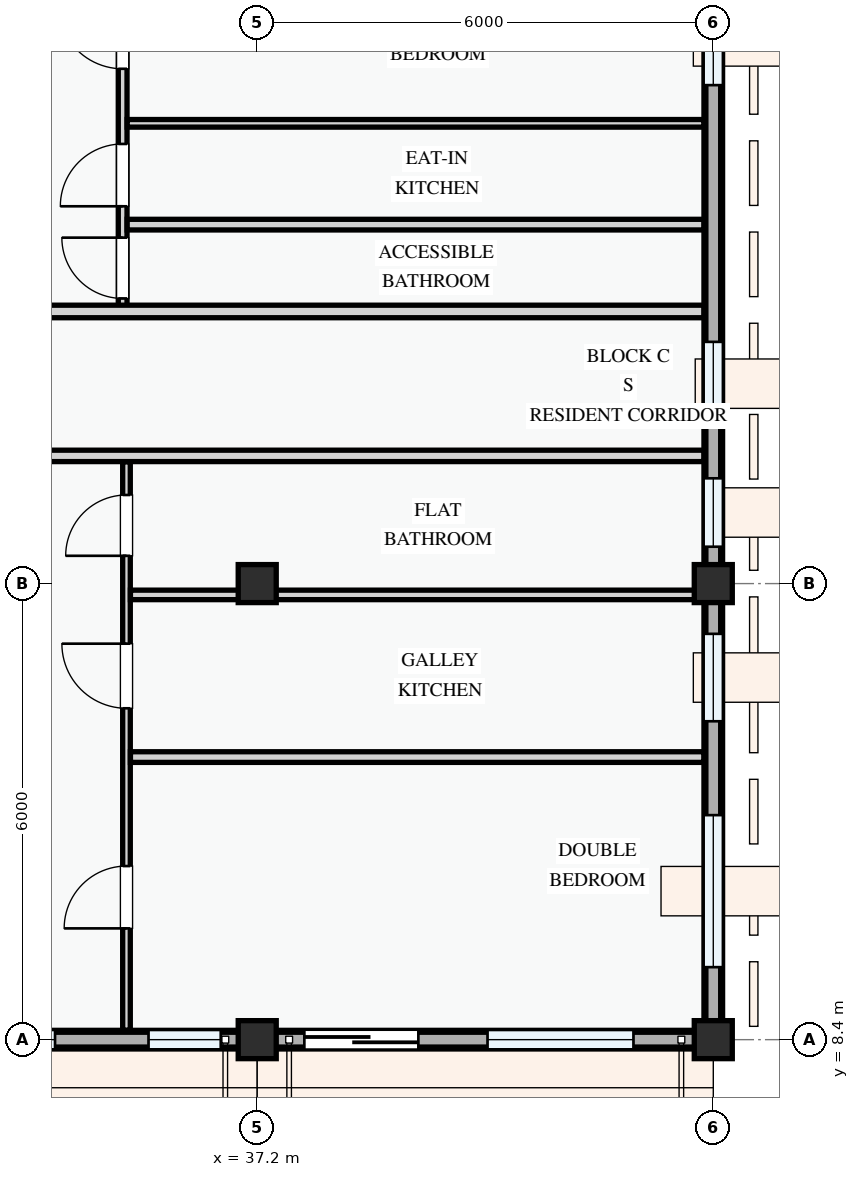
"""IFC4 building model, lengths in metres.
Left out: names, types, materials, properties, quantities, classifications, styles, units other than length and angle.
Written with IfcOpenShell. Run it as: python <this file> out.ifc"""

import sys

from ifc_helpers import new_model, si_unit, direction, frame, frame_2d, origin, origin_2d, place, context, subcontext, project, spatial, polyline, rectangle, outline, extrude, element, fill, save


model = new_model("IFC4")
c1 = context("Model", 3, precision=1e-05, world=origin(), true_north=direction((0.0, 1.0)))
c2 = subcontext(c1, "Body", "Model", "MODEL_VIEW")
j1 = project(units=[si_unit("LENGTHUNIT", "METRE"), si_unit("PLANEANGLEUNIT", "RADIAN")], contexts=[c1])
p1 = place(None, origin())
s1 = spatial("IfcSite", under=j1, at=p1, CompositionType="ELEMENT")
p2 = place(p1, origin())
s2 = spatial("IfcBuilding", under=s1, at=p2, CompositionType="ELEMENT")
p3 = place(p2, frame((0.0, 0.0, 34.5)))
s3 = spatial("IfcBuildingStorey", under=s2, at=p3, CompositionType="ELEMENT", Elevation=34.5)
for number, where, z_axis, x_axis in (
    (1, (37.2, 8.4, 0.0), (0.0, 0.0, 1.0), (1.0, 0.0, 0.0)),
    (2, (37.2, 14.4, 0.0), (0.0, 0.0, 1.0), (1.0, 0.0, 0.0)),
    (3, (43.2, 8.4, 0.0), (0.0, 0.0, 1.0), (1.0, 0.0, 0.0)),
    (4, (43.2, 14.4, 0.0), (0.0, 0.0, 1.0), (1.0, 0.0, 0.0)),
):
    element("IfcColumn", number, at=place(p3, frame(where, z_axis=z_axis, x_axis=x_axis)), inside=s3, PredefinedType="COLUMN", context=c2, shape_type="SweptSolid", body=[
        extrude(rectangle(XDim=0.5, YDim=0.5, at=origin_2d()), origin(), (0.0, 0.0, 1.0), 3.3),
    ])
p4 = place(p3, frame((28.8, 8.4, 0.0), z_axis=(0.0, 0.0, 1.0), x_axis=(1.0, 0.0, 0.0)))
e5 = element("IfcWall", 5, at=p4, inside=s3, PredefinedType="STANDARD", context=c2, shape_type="SweptSolid", body=[
    extrude(rectangle(XDim=8.4, YDim=0.245, at=frame_2d((4.2, 0.0))), origin(), (0.0, 0.0, 1.0), 2.375),
])
p5 = place(p4, frame((2.15, 0.0, 0.0)))
e6 = element("IfcOpeningElement", 6, at=p5, cuts=e5, PredefinedType="OPENING", context=c2, shape_type="SweptSolid", body=[
    extrude(rectangle(XDim=1.4, YDim=2.2, at=frame_2d((0.7, 1.1))), frame((0.0, 0.133, 0.0), z_axis=(0.0, -1.0, 0.0), x_axis=(1.0, 0.0, 0.0)), (0.0, 0.0, 1.0), 0.265),
])
p6 = place(p4, frame((0.505, 0.0, 0.78)))
e7 = element("IfcOpeningElement", 7, at=p6, cuts=e5, PredefinedType="OPENING", context=c2, shape_type="SweptSolid", body=[
    extrude(rectangle(XDim=1.0, YDim=1.25, at=frame_2d((0.5, 0.625))), frame((0.0, 0.133, 0.0), z_axis=(0.0, -1.0, 0.0), x_axis=(1.0, 0.0, 0.0)), (0.0, 0.0, 1.0), 0.265),
])
p7 = place(p4, frame((4.54, 0.0, 0.78)))
e8 = element("IfcOpeningElement", 8, at=p7, cuts=e5, PredefinedType="OPENING", context=c2, shape_type="SweptSolid", body=[
    extrude(rectangle(XDim=1.2, YDim=1.35, at=frame_2d((0.6, 0.675))), frame((0.0, 0.133, 0.0), z_axis=(0.0, -1.0, 0.0), x_axis=(1.0, 0.0, 0.0)), (0.0, 0.0, 1.0), 0.265),
])
p8 = place(p4, frame((6.97, 0.0, 0.78)))
e9 = element("IfcOpeningElement", 9, at=p8, cuts=e5, PredefinedType="OPENING", context=c2, shape_type="SweptSolid", body=[
    extrude(rectangle(XDim=0.95, YDim=1.15, at=frame_2d((0.475, 0.575))), frame((0.0, 0.133, 0.0), z_axis=(0.0, -1.0, 0.0), x_axis=(1.0, 0.0, 0.0)), (0.0, 0.0, 1.0), 0.265),
])
p9 = place(p3, frame((37.2, 8.4, 0.0), z_axis=(0.0, 0.0, 1.0), x_axis=(1.0, 0.0, 0.0)))
e10 = element("IfcWall", 10, at=p9, inside=s3, PredefinedType="STANDARD", context=c2, shape_type="SweptSolid", body=[
    extrude(rectangle(XDim=6.0, YDim=0.245, at=frame_2d((3.0, 0.0))), origin(), (0.0, 0.0, 1.0), 2.525),
])
p10 = place(p9, frame((0.62, 0.0, 0.0)))
e11 = element("IfcOpeningElement", 11, at=p10, cuts=e10, PredefinedType="OPENING", context=c2, shape_type="SweptSolid", body=[
    extrude(rectangle(XDim=1.5, YDim=2.2, at=frame_2d((0.75, 1.1))), frame((0.0, 0.133, 0.0), z_axis=(0.0, -1.0, 0.0), x_axis=(1.0, 0.0, 0.0)), (0.0, 0.0, 1.0), 0.265),
])
p11 = place(p9, frame((3.03, 0.0, 0.78)))
e12 = element("IfcOpeningElement", 12, at=p11, cuts=e10, PredefinedType="OPENING", context=c2, shape_type="SweptSolid", body=[
    extrude(rectangle(XDim=1.92, YDim=1.44, at=frame_2d((0.96, 0.72))), frame((0.0, 0.133, 0.0), z_axis=(0.0, -1.0, 0.0), x_axis=(1.0, 0.0, 0.0)), (0.0, 0.0, 1.0), 0.265),
])
p12 = place(p3, frame((43.2, 8.4, 0.0), z_axis=(0.0, 0.0, 1.0), x_axis=(0.0, 1.0, 0.0)))
e13 = element("IfcWall", 13, at=p12, inside=s3, PredefinedType="STANDARD", context=c2, shape_type="SweptSolid", body=[
    extrude(rectangle(XDim=6.0, YDim=0.245, at=frame_2d((3.0, 0.0))), origin(), (0.0, 0.0, 1.0), 2.575),
])
p13 = place(p12, frame((0.954, 0.0, 0.78)))
e14 = element("IfcOpeningElement", 14, at=p13, cuts=e13, PredefinedType="OPENING", context=c2, shape_type="SweptSolid", body=[
    extrude(rectangle(XDim=2.0, YDim=1.5, at=frame_2d((1.0, 0.75))), frame((0.0, 0.133, 0.0), z_axis=(0.0, -1.0, 0.0), x_axis=(1.0, 0.0, 0.0)), (0.0, 0.0, 1.0), 0.265),
])
p14 = place(p12, frame((4.189, 0.0, 0.78)))
e15 = element("IfcOpeningElement", 15, at=p14, cuts=e13, PredefinedType="OPENING", context=c2, shape_type="SweptSolid", body=[
    extrude(rectangle(XDim=1.15, YDim=1.25, at=frame_2d((0.575, 0.625))), frame((0.0, 0.133, 0.0), z_axis=(0.0, -1.0, 0.0), x_axis=(1.0, 0.0, 0.0)), (0.0, 0.0, 1.0), 0.265),
])
p15 = place(p3, frame((43.2, 14.4, 0.0), z_axis=(0.0, 0.0, 1.0), x_axis=(0.0, 1.0, 0.0)))
e16 = element("IfcWall", 16, at=p15, inside=s3, PredefinedType="STANDARD", context=c2, shape_type="SweptSolid", body=[
    extrude(rectangle(XDim=8.4, YDim=0.245, at=frame_2d((4.2, 0.0))), origin(), (0.0, 0.0, 1.0), 2.425),
])
p16 = place(p15, frame((0.485, 0.0, 0.78)))
e17 = element("IfcOpeningElement", 17, at=p16, cuts=e16, PredefinedType="OPENING", context=c2, shape_type="SweptSolid", body=[
    extrude(rectangle(XDim=0.9, YDim=1.2, at=frame_2d((0.45, 0.6))), frame((0.0, 0.133, 0.0), z_axis=(0.0, -1.0, 0.0), x_axis=(1.0, 0.0, 0.0)), (0.0, 0.0, 1.0), 0.265),
])
p17 = place(p15, frame((2.08, 0.0, 0.78)))
e18 = element("IfcOpeningElement", 18, at=p17, cuts=e16, PredefinedType="OPENING", context=c2, shape_type="SweptSolid", body=[
    extrude(rectangle(XDim=1.1, YDim=1.3, at=frame_2d((0.55, 0.65))), frame((0.0, 0.133, 0.0), z_axis=(0.0, -1.0, 0.0), x_axis=(1.0, 0.0, 0.0)), (0.0, 0.0, 1.0), 0.265),
])
p18 = place(p15, frame((6.558, 0.0, 0.78)))
e19 = element("IfcOpeningElement", 19, at=p18, cuts=e16, PredefinedType="OPENING", context=c2, shape_type="SweptSolid", body=[
    extrude(rectangle(XDim=1.15, YDim=1.25, at=frame_2d((0.575, 0.625))), frame((0.0, 0.133, 0.0), z_axis=(0.0, -1.0, 0.0), x_axis=(1.0, 0.0, 0.0)), (0.0, 0.0, 1.0), 0.265),
])
p19 = place(p3, frame((28.8, 8.4, 3.3), z_axis=(0.0, 0.0, 1.0), x_axis=(1.0, 0.0, 0.0)))
e20 = element("IfcWall", 20, at=p19, inside=s3, PredefinedType="PARAPET", context=c2, shape_type="SweptSolid", body=[
    extrude(outline(polyline([(0.0, 0.0), (8.4, 0.0), (8.4, 1.12), (7.7, 1.322), (7.0, 1.484), (6.3, 1.618), (5.6, 1.717), (4.9, 1.779), (4.2, 1.8), (3.5, 1.779), (2.8, 1.717), (2.1, 1.618), (1.4, 1.484), (0.7, 1.322), (0.0, 1.12), (0.0, 0.0)])), frame((0.0, 0.098, 0.0), z_axis=(0.0, -1.0, 0.0), x_axis=(1.0, 0.0, 0.0)), (0.0, 0.0, 1.0), 0.195),
])
p20 = place(p3, frame((37.2, 8.4, 3.3), z_axis=(0.0, 0.0, 1.0), x_axis=(1.0, 0.0, 0.0)))
e21 = element("IfcWall", 21, at=p20, inside=s3, PredefinedType="PARAPET", context=c2, shape_type="SweptSolid", body=[
    extrude(outline(polyline([(0.0, 0.0), (6.0, 0.0), (6.0, 1.12), (5.5, 1.322), (5.0, 1.484), (4.5, 1.618), (4.0, 1.717), (3.5, 1.779), (3.0, 1.8), (2.5, 1.779), (2.0, 1.717), (1.5, 1.618), (1.0, 1.484), (0.5, 1.322), (0.0, 1.12), (0.0, 0.0)])), frame((0.0, 0.098, 0.0), z_axis=(0.0, -1.0, 0.0), x_axis=(1.0, 0.0, 0.0)), (0.0, 0.0, 1.0), 0.195),
])
p21 = place(p3, frame((43.2, 8.4, 3.3), z_axis=(0.0, 0.0, 1.0), x_axis=(0.0, 1.0, 0.0)))
e22 = element("IfcWall", 22, at=p21, inside=s3, PredefinedType="PARAPET", context=c2, shape_type="SweptSolid", body=[
    extrude(rectangle(XDim=14.4, YDim=0.195, at=frame_2d((7.2, 0.0))), origin(), (0.0, 0.0, 1.0), 1.15),
])
p22 = place(p3, frame((35.48, 8.524, 0.0), z_axis=(0.0, 0.0, 1.0), x_axis=(0.0, 1.0, 0.0)))
e23 = element("IfcWall", 23, at=p22, inside=s3, PredefinedType="PARTITIONING", context=c2, shape_type="SweptSolid", body=[
    extrude(rectangle(XDim=7.479, YDim=0.1, at=frame_2d((3.739, 0.0))), origin(), (0.0, 0.0, 1.0), 3.0),
])
p23 = place(p22, frame((1.339, 0.0, 0.0)))
e24 = element("IfcOpeningElement", 24, at=p23, cuts=e23, PredefinedType="OPENING", context=c2, shape_type="SweptSolid", body=[
    extrude(rectangle(XDim=0.82, YDim=2.08, at=frame_2d((0.41, 1.04))), frame((0.0, 0.06, 0.0), z_axis=(0.0, -1.0, 0.0), x_axis=(1.0, 0.0, 0.0)), (0.0, 0.0, 1.0), 0.12),
])
p24 = place(p22, frame((4.235, 0.0, 0.0)))
e25 = element("IfcOpeningElement", 25, at=p24, cuts=e23, PredefinedType="OPENING", context=c2, shape_type="SweptSolid", body=[
    extrude(rectangle(XDim=0.85, YDim=2.1, at=frame_2d((0.425, 1.05))), frame((0.0, 0.06, 0.0), z_axis=(0.0, -1.0, 0.0), x_axis=(1.0, 0.0, 0.0)), (0.0, 0.0, 1.0), 0.12),
])
p25 = place(p22, frame((6.241, 0.0, 0.0)))
e26 = element("IfcOpeningElement", 26, at=p25, cuts=e23, PredefinedType="OPENING", context=c2, shape_type="SweptSolid", body=[
    extrude(rectangle(XDim=0.8, YDim=2.1, at=frame_2d((0.4, 1.05))), frame((0.0, 0.06, 0.0), z_axis=(0.0, -1.0, 0.0), x_axis=(1.0, 0.0, 0.0)), (0.0, 0.0, 1.0), 0.12),
])
p26 = place(p3, frame((35.532, 12.118, 0.0), z_axis=(0.0, 0.0, 1.0), x_axis=(1.0, 0.0, 0.0)))
e27 = element("IfcWall", 27, at=p26, inside=s3, PredefinedType="PARTITIONING", context=c2, shape_type="SweptSolid", body=[
    extrude(rectangle(XDim=7.543, YDim=0.14, at=frame_2d((3.772, 0.0))), origin(), (0.0, 0.0, 1.0), 3.0),
])
p27 = place(p3, frame((35.532, 14.251, 0.0), z_axis=(0.0, 0.0, 1.0), x_axis=(1.0, 0.0, 0.0)))
e28 = element("IfcWall", 28, at=p27, inside=s3, PredefinedType="PARTITIONING", context=c2, shape_type="SweptSolid", body=[
    extrude(rectangle(XDim=7.543, YDim=0.125, at=frame_2d((3.772, 0.0))), origin(), (0.0, 0.0, 1.0), 2.375),
])
p28 = place(p3, frame((35.43, 17.98, 0.0), z_axis=(0.0, 0.0, 1.0), x_axis=(0.0, 1.0, 0.0)))
e29 = element("IfcWall", 29, at=p28, inside=s3, PredefinedType="PARTITIONING", context=c2, shape_type="SweptSolid", body=[
    extrude(rectangle(XDim=4.696, YDim=0.115, at=frame_2d((2.348, 0.0))), origin(), (0.0, 0.0, 1.0), 3.0),
])
p29 = place(p28, frame((0.171, 0.0, 0.0)))
e30 = element("IfcOpeningElement", 30, at=p29, cuts=e29, PredefinedType="OPENING", context=c2, shape_type="SweptSolid", body=[
    extrude(rectangle(XDim=0.8, YDim=2.1, at=frame_2d((0.4, 1.05))), frame((0.0, 0.067, 0.0), z_axis=(0.0, -1.0, 0.0), x_axis=(1.0, 0.0, 0.0)), (0.0, 0.0, 1.0), 0.135),
])
p30 = place(p28, frame((1.384, 0.0, 0.0)))
e31 = element("IfcOpeningElement", 31, at=p30, cuts=e29, PredefinedType="OPENING", context=c2, shape_type="SweptSolid", body=[
    extrude(rectangle(XDim=0.82, YDim=2.08, at=frame_2d((0.41, 1.04))), frame((0.0, 0.067, 0.0), z_axis=(0.0, -1.0, 0.0), x_axis=(1.0, 0.0, 0.0)), (0.0, 0.0, 1.0), 0.135),
])
p31 = place(p28, frame((3.193, 0.0, 0.0)))
e32 = element("IfcOpeningElement", 32, at=p31, cuts=e29, PredefinedType="OPENING", context=c2, shape_type="SweptSolid", body=[
    extrude(rectangle(XDim=0.85, YDim=2.1, at=frame_2d((0.425, 1.05))), frame((0.0, 0.067, 0.0), z_axis=(0.0, -1.0, 0.0), x_axis=(1.0, 0.0, 0.0)), (0.0, 0.0, 1.0), 0.135),
])
p32 = place(p3, frame((35.489, 20.455, 0.0), z_axis=(0.0, 0.0, 1.0), x_axis=(1.0, 0.0, 0.0)))
e33 = element("IfcWall", 33, at=p32, inside=s3, PredefinedType="PARTITIONING", context=c2, shape_type="SweptSolid", body=[
    extrude(rectangle(XDim=7.586, YDim=0.1, at=frame_2d((3.793, 0.0))), origin(), (0.0, 0.0, 1.0), 3.0),
])
p33 = place(p3, frame((35.489, 19.122, 0.0), z_axis=(0.0, 0.0, 1.0), x_axis=(1.0, 0.0, 0.0)))
e34 = element("IfcWall", 34, at=p33, inside=s3, PredefinedType="PARTITIONING", context=c2, shape_type="SweptSolid", body=[
    extrude(rectangle(XDim=7.586, YDim=0.14, at=frame_2d((3.793, 0.0))), origin(), (0.0, 0.0, 1.0), 3.0),
])
p34 = place(p3, frame((22.66, 16.08, 0.0), z_axis=(0.0, 0.0, 1.0), x_axis=(1.0, 0.0, 0.0)))
e35 = element("IfcWall", 35, at=p34, inside=s3, PredefinedType="PARTITIONING", context=c2, shape_type="SweptSolid", body=[
    extrude(rectangle(XDim=20.416, YDim=0.15, at=frame_2d((10.208, 0.0))), origin(), (0.0, 0.0, 1.0), 3.0),
])
p35 = place(p34, frame((2.691, 0.0, 0.0)))
e36 = element("IfcOpeningElement", 36, at=p35, cuts=e35, PredefinedType="OPENING", context=c2, shape_type="SweptSolid", body=[
    extrude(rectangle(XDim=0.92, YDim=2.1, at=frame_2d((0.46, 1.05))), frame((0.0, 0.085, 0.0), z_axis=(0.0, -1.0, 0.0), x_axis=(1.0, 0.0, 0.0)), (0.0, 0.0, 1.0), 0.17),
])
p36 = place(p34, frame((9.91, 0.0, 0.0)))
e37 = element("IfcOpeningElement", 37, at=p36, cuts=e35, PredefinedType="OPENING", context=c2, shape_type="SweptSolid", body=[
    extrude(rectangle(XDim=0.92, YDim=2.1, at=frame_2d((0.46, 1.05))), frame((0.0, 0.085, 0.0), z_axis=(0.0, -1.0, 0.0), x_axis=(1.0, 0.0, 0.0)), (0.0, 0.0, 1.0), 0.17),
])
p37 = place(p3, frame((22.66, 17.98, 0.0), z_axis=(0.0, 0.0, 1.0), x_axis=(1.0, 0.0, 0.0)))
e38 = element("IfcWall", 38, at=p37, inside=s3, PredefinedType="PARTITIONING", context=c2, shape_type="SweptSolid", body=[
    extrude(rectangle(XDim=20.416, YDim=0.165, at=frame_2d((10.208, 0.0))), origin(), (0.0, 0.0, 1.0), 3.0),
])
p38 = place(p37, frame((2.611, 0.0, 0.0)))
e39 = element("IfcOpeningElement", 39, at=p38, cuts=e38, PredefinedType="OPENING", context=c2, shape_type="SweptSolid", body=[
    extrude(rectangle(XDim=0.92, YDim=2.1, at=frame_2d((0.46, 1.05))), frame((0.0, 0.093, 0.0), z_axis=(0.0, -1.0, 0.0), x_axis=(1.0, 0.0, 0.0)), (0.0, 0.0, 1.0), 0.185),
])
p39 = place(p37, frame((9.885, 0.0, 0.0)))
e40 = element("IfcOpeningElement", 40, at=p39, cuts=e38, PredefinedType="OPENING", context=c2, shape_type="SweptSolid", body=[
    extrude(rectangle(XDim=0.96, YDim=2.12, at=frame_2d((0.48, 1.06))), frame((0.0, 0.093, 0.0), z_axis=(0.0, -1.0, 0.0), x_axis=(1.0, 0.0, 0.0)), (0.0, 0.0, 1.0), 0.185),
])
p40 = place(p7, origin())
e41 = element("IfcWindow", 41, at=p40, inside=s3, PartitioningType="SINGLE_PANEL", PredefinedType="WINDOW", context=c2, shape_type="SweptSolid", body=[
    extrude(rectangle(XDim=1.2, YDim=1.35, at=frame_2d((0.6, 0.675))), frame((0.0, 0.03, 0.0), z_axis=(0.0, -1.0, 0.0), x_axis=(1.0, 0.0, 0.0)), (0.0, 0.0, 1.0), 0.06),
])
fill(e8, e41)
p41 = place(p8, origin())
e42 = element("IfcWindow", 42, at=p41, inside=s3, PartitioningType="SINGLE_PANEL", PredefinedType="WINDOW", context=c2, shape_type="SweptSolid", body=[
    extrude(rectangle(XDim=0.95, YDim=1.15, at=frame_2d((0.475, 0.575))), frame((0.0, 0.03, 0.0), z_axis=(0.0, -1.0, 0.0), x_axis=(1.0, 0.0, 0.0)), (0.0, 0.0, 1.0), 0.06),
])
fill(e9, e42)
p42 = place(p10, frame((1.5, 0.0, 0.0), z_axis=(0.0, 0.0, 1.0), x_axis=(-1.0, 0.0, 0.0)))
e43 = element("IfcDoor", 43, at=p42, inside=s3, OperationType="SLIDING_TO_RIGHT", PredefinedType="DOOR", context=c2, shape_type="SweptSolid", body=[
    extrude(rectangle(XDim=1.5, YDim=2.2, at=frame_2d((0.75, 1.1))), frame((0.0, 0.025, 0.0), z_axis=(0.0, -1.0, 0.0), x_axis=(1.0, 0.0, 0.0)), (0.0, 0.0, 1.0), 0.05),
])
fill(e11, e43)
p43 = place(p11, origin())
e44 = element("IfcWindow", 44, at=p43, inside=s3, PartitioningType="DOUBLE_PANEL_VERTICAL", PredefinedType="WINDOW", context=c2, shape_type="SweptSolid", body=[
    extrude(rectangle(XDim=1.92, YDim=1.44, at=frame_2d((0.96, 0.72))), frame((0.0, 0.03, 0.0), z_axis=(0.0, -1.0, 0.0), x_axis=(1.0, 0.0, 0.0)), (0.0, 0.0, 1.0), 0.06),
])
fill(e12, e44)
p44 = place(p13, origin())
e45 = element("IfcWindow", 45, at=p44, inside=s3, PartitioningType="DOUBLE_PANEL_VERTICAL", PredefinedType="WINDOW", context=c2, shape_type="SweptSolid", body=[
    extrude(rectangle(XDim=2.0, YDim=1.5, at=frame_2d((1.0, 0.75))), frame((0.0, 0.03, 0.0), z_axis=(0.0, -1.0, 0.0), x_axis=(1.0, 0.0, 0.0)), (0.0, 0.0, 1.0), 0.06),
])
fill(e14, e45)
p45 = place(p14, origin())
e46 = element("IfcWindow", 46, at=p45, inside=s3, PartitioningType="SINGLE_PANEL", PredefinedType="WINDOW", context=c2, shape_type="SweptSolid", body=[
    extrude(rectangle(XDim=1.15, YDim=1.25, at=frame_2d((0.575, 0.625))), frame((0.0, 0.03, 0.0), z_axis=(0.0, -1.0, 0.0), x_axis=(1.0, 0.0, 0.0)), (0.0, 0.0, 1.0), 0.06),
])
fill(e15, e46)
p46 = place(p16, origin())
e47 = element("IfcWindow", 47, at=p46, inside=s3, PartitioningType="SINGLE_PANEL", PredefinedType="WINDOW", context=c2, shape_type="SweptSolid", body=[
    extrude(rectangle(XDim=0.9, YDim=1.2, at=frame_2d((0.45, 0.6))), frame((0.0, 0.03, 0.0), z_axis=(0.0, -1.0, 0.0), x_axis=(1.0, 0.0, 0.0)), (0.0, 0.0, 1.0), 0.06),
])
fill(e17, e47)
p47 = place(p17, origin())
e48 = element("IfcWindow", 48, at=p47, inside=s3, PartitioningType="SINGLE_PANEL", PredefinedType="WINDOW", context=c2, shape_type="SweptSolid", body=[
    extrude(rectangle(XDim=1.1, YDim=1.3, at=frame_2d((0.55, 0.65))), frame((0.0, 0.03, 0.0), z_axis=(0.0, -1.0, 0.0), x_axis=(1.0, 0.0, 0.0)), (0.0, 0.0, 1.0), 0.06),
])
fill(e18, e48)
p48 = place(p18, origin())
e49 = element("IfcWindow", 49, at=p48, inside=s3, PartitioningType="SINGLE_PANEL", PredefinedType="WINDOW", context=c2, shape_type="SweptSolid", body=[
    extrude(rectangle(XDim=1.15, YDim=1.25, at=frame_2d((0.575, 0.625))), frame((0.0, 0.03, 0.0), z_axis=(0.0, -1.0, 0.0), x_axis=(1.0, 0.0, 0.0)), (0.0, 0.0, 1.0), 0.06),
])
fill(e19, e49)
p49 = place(p23, origin())
e50 = element("IfcDoor", 50, at=p49, inside=s3, OperationType="SINGLE_SWING_LEFT", PredefinedType="DOOR", context=c2, shape_type="SweptSolid", body=[
    extrude(rectangle(XDim=0.82, YDim=2.08, at=frame_2d((0.41, 1.04))), frame((0.0, 0.025, 0.0), z_axis=(0.0, -1.0, 0.0), x_axis=(1.0, 0.0, 0.0)), (0.0, 0.0, 1.0), 0.05),
])
fill(e24, e50)
p50 = place(p24, origin())
e51 = element("IfcDoor", 51, at=p50, inside=s3, OperationType="SINGLE_SWING_RIGHT", PredefinedType="DOOR", context=c2, shape_type="SweptSolid", body=[
    extrude(rectangle(XDim=0.85, YDim=2.1, at=frame_2d((0.425, 1.05))), frame((0.0, 0.025, 0.0), z_axis=(0.0, -1.0, 0.0), x_axis=(1.0, 0.0, 0.0)), (0.0, 0.0, 1.0), 0.05),
])
fill(e25, e51)
p51 = place(p25, origin())
e52 = element("IfcDoor", 52, at=p51, inside=s3, OperationType="SINGLE_SWING_LEFT", PredefinedType="DOOR", context=c2, shape_type="SweptSolid", body=[
    extrude(rectangle(XDim=0.8, YDim=2.1, at=frame_2d((0.4, 1.05))), frame((0.0, 0.025, 0.0), z_axis=(0.0, -1.0, 0.0), x_axis=(1.0, 0.0, 0.0)), (0.0, 0.0, 1.0), 0.05),
])
fill(e26, e52)
p52 = place(p29, origin())
e53 = element("IfcDoor", 53, at=p52, inside=s3, OperationType="SINGLE_SWING_RIGHT", PredefinedType="DOOR", context=c2, shape_type="SweptSolid", body=[
    extrude(rectangle(XDim=0.8, YDim=2.1, at=frame_2d((0.4, 1.05))), frame((0.0, 0.025, 0.0), z_axis=(0.0, -1.0, 0.0), x_axis=(1.0, 0.0, 0.0)), (0.0, 0.0, 1.0), 0.05),
])
fill(e30, e53)
p53 = place(p30, origin())
e54 = element("IfcDoor", 54, at=p53, inside=s3, OperationType="SINGLE_SWING_LEFT", PredefinedType="DOOR", context=c2, shape_type="SweptSolid", body=[
    extrude(rectangle(XDim=0.82, YDim=2.08, at=frame_2d((0.41, 1.04))), frame((0.0, 0.025, 0.0), z_axis=(0.0, -1.0, 0.0), x_axis=(1.0, 0.0, 0.0)), (0.0, 0.0, 1.0), 0.05),
])
fill(e31, e54)
p54 = place(p31, origin())
e55 = element("IfcDoor", 55, at=p54, inside=s3, OperationType="SINGLE_SWING_RIGHT", PredefinedType="DOOR", context=c2, shape_type="SweptSolid", body=[
    extrude(rectangle(XDim=0.85, YDim=2.1, at=frame_2d((0.425, 1.05))), frame((0.0, 0.025, 0.0), z_axis=(0.0, -1.0, 0.0), x_axis=(1.0, 0.0, 0.0)), (0.0, 0.0, 1.0), 0.05),
])
fill(e32, e55)
save(model, sys.argv[1])
